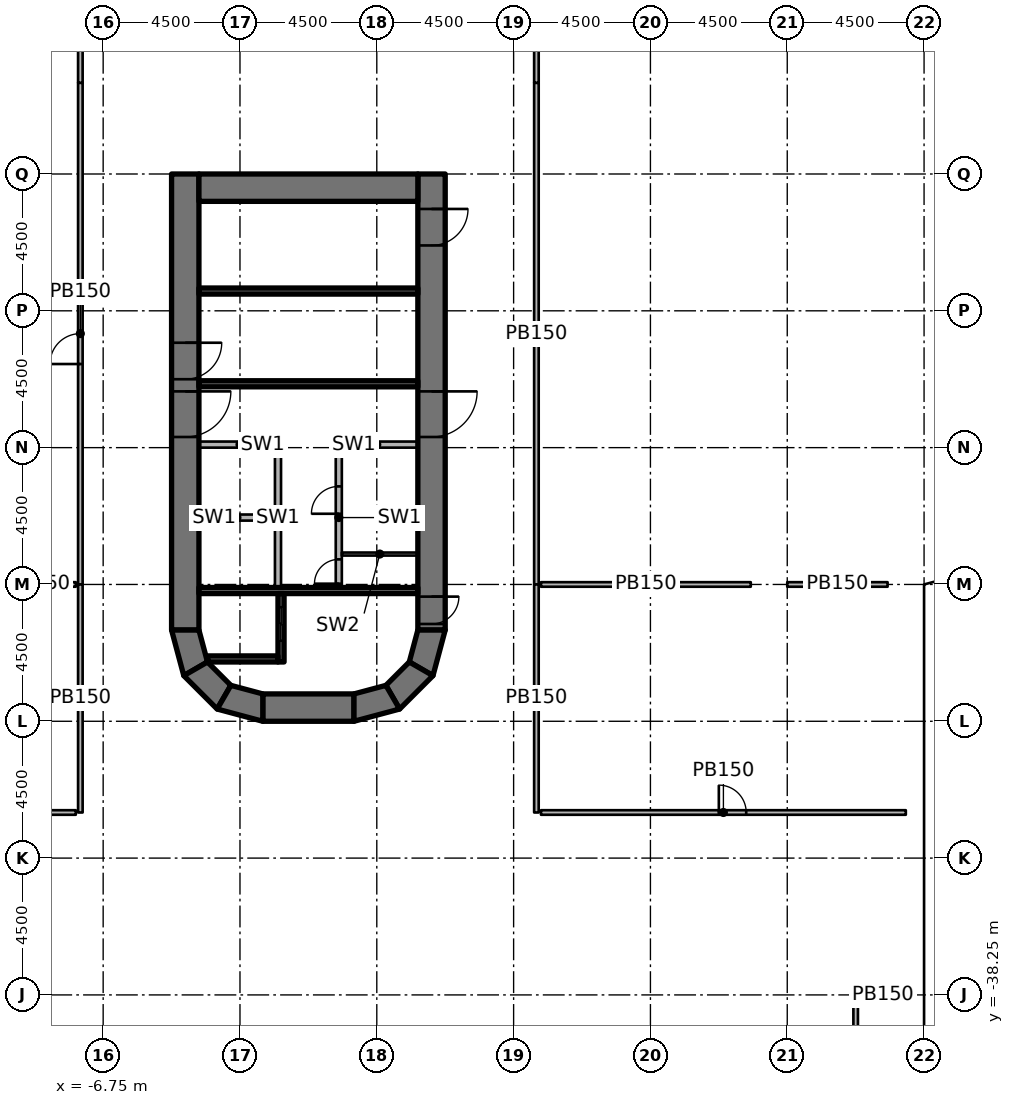
"""IFC4 building model, lengths in metres.
Left out: names, types, materials, properties, quantities, classifications, styles, units other than length and angle.
Written with IfcOpenShell. Run it as: python <this file> out.ifc"""

import sys

from ifc_helpers import new_model, si_unit, direction, frame, frame_2d, origin, origin_2d, place, context, subcontext, project, spatial, polyline, rectangle, outline, extrude, element, fill, save


model = new_model("IFC4")
c1 = context("Model", 3, precision=1e-05, world=origin(), true_north=direction((0.0, 1.0)))
c2 = subcontext(c1, "Body", "Model", "MODEL_VIEW")
j1 = project(units=[si_unit("LENGTHUNIT", "METRE"), si_unit("PLANEANGLEUNIT", "RADIAN")], contexts=[c1])
p1 = place(None, origin())
s1 = spatial("IfcSite", under=j1, at=p1, CompositionType="ELEMENT")
p2 = place(p1, origin())
s2 = spatial("IfcBuilding", under=s1, at=p2, CompositionType="ELEMENT")
p3 = place(p2, frame((0.0, 0.0, 12.0)))
s3 = spatial("IfcBuildingStorey", under=s2, at=p3, CompositionType="ELEMENT", Elevation=12.0)
for number, where, z_axis, x_axis in (
    (1, (-6.25, -26.9, 0.0), (0.0, 0.0, 1.0), (1.0, 0.0, 0.0)),
    (2, (-6.25, -24.65, 0.0), (0.0, 0.0, 1.0), (1.0, 0.0, 0.0)),
    (3, (-6.25, -20.25, 0.0), (0.0, 0.0, 1.0), (1.0, 0.0, 0.0)),
    (4, (-6.25, -15.75, 0.0), (0.0, 0.0, 1.0), (1.0, 0.0, 0.0)),
    (5, (-6.25, -10.75, 0.0), (0.0, 0.0, 1.0), (1.0, 0.0, 0.0)),
    (6, (-2.25, -33.11, 0.0), (0.0, 0.0, 1.0), (1.0, 0.0, 0.0)),
    (7, (2.25, -33.11, 0.0), (0.0, 0.0, 1.0), (1.0, 0.0, 0.0)),
    (8, (6.25, -26.9, 0.0), (0.0, 0.0, 1.0), (1.0, 0.0, 0.0)),
    (9, (6.25, -24.65, 0.0), (0.0, 0.0, 1.0), (1.0, 0.0, 0.0)),
    (10, (6.25, -20.25, 0.0), (0.0, 0.0, 1.0), (1.0, 0.0, 0.0)),
    (11, (6.25, -15.75, 0.0), (0.0, 0.0, 1.0), (1.0, 0.0, 0.0)),
    (12, (6.25, -10.75, 0.0), (0.0, 0.0, 1.0), (1.0, 0.0, 0.0)),
    (13, (10.65, -38.85, 0.0), (0.0, 0.0, 1.0), (1.0, 0.0, 0.0)),
    (14, (10.65, -33.75, 0.0), (0.0, 0.0, 1.0), (1.0, 0.0, 0.0)),
    (15, (10.65, -20.25, 0.0), (0.0, 0.0, 1.0), (1.0, 0.0, 0.0)),
    (16, (10.65, -15.15, 0.0), (0.0, 0.0, 1.0), (1.0, 0.0, 0.0)),
    (17, (15.367, -39.68, 0.0), (0.0, 0.0, 1.0), (1.0, 0.0, 0.0)),
    (18, (15.15, -24.75, 0.0), (0.0, 0.0, 1.0), (1.0, 0.0, 0.0)),
    (19, (15.15, -19.65, 0.0), (0.0, 0.0, 1.0), (1.0, 0.0, 0.0)),
    (20, (15.15, -10.65, 0.0), (0.0, 0.0, 1.0), (1.0, 0.0, 0.0)),
    (21, (19.65, -29.25, 0.0), (0.0, 0.0, 1.0), (1.0, 0.0, 0.0)),
    (22, (19.65, -24.15, 0.0), (0.0, 0.0, 1.0), (1.0, 0.0, 0.0)),
    (23, (19.65, -15.15, 0.0), (0.0, 0.0, 1.0), (1.0, 0.0, 0.0)),
):
    element("IfcColumn", number, at=place(p3, frame(where, z_axis=z_axis, x_axis=x_axis)), inside=s3, PredefinedType="COLUMN", context=c2, shape_type="SweptSolid", body=[
        extrude(rectangle(XDim=1.2, YDim=1.2, at=origin_2d()), origin(), (0.0, 0.0, 1.0), 4.55),
    ])
p4 = place(p3, frame((-4.05, -11.25, 0.0), z_axis=(0.0, 0.0, 1.0), x_axis=(0.0, -1.0, 0.0)))
e24 = element("IfcWall", 24, at=p4, inside=s3, PredefinedType="SHEAR", context=c2, shape_type="SweptSolid", body=[
    extrude(rectangle(XDim=15.0, YDim=0.9, at=frame_2d((7.5, 0.0))), origin(), (0.0, 0.0, 1.0), 5.0),
])
p5 = place(p4, frame((7.15, 0.0, 0.0)))
e25 = element("IfcOpeningElement", 25, at=p5, cuts=e24, PredefinedType="OPENING", context=c2, shape_type="SweptSolid", body=[
    extrude(rectangle(XDim=1.5, YDim=2.3, at=frame_2d((0.75, 1.15))), frame((0.0, 0.46, 0.0), z_axis=(0.0, -1.0, 0.0), x_axis=(1.0, 0.0, 0.0)), (0.0, 0.0, 1.0), 0.92),
])
p6 = place(p4, frame((5.55, 0.0, 0.0)))
e26 = element("IfcOpeningElement", 26, at=p6, cuts=e24, PredefinedType="OPENING", context=c2, shape_type="SweptSolid", body=[
    extrude(rectangle(XDim=1.2, YDim=2.1, at=frame_2d((0.6, 1.05))), frame((0.0, 0.46, 0.0), z_axis=(0.0, -1.0, 0.0), x_axis=(1.0, 0.0, 0.0)), (0.0, 0.0, 1.0), 0.92),
])
p7 = place(p3, frame((4.05, -11.25, 0.0), z_axis=(0.0, 0.0, 1.0), x_axis=(0.0, -1.0, 0.0)))
e27 = element("IfcWall", 27, at=p7, inside=s3, PredefinedType="SHEAR", context=c2, shape_type="SweptSolid", body=[
    extrude(rectangle(XDim=15.0, YDim=0.9, at=frame_2d((7.5, 0.0))), origin(), (0.0, 0.0, 1.0), 5.0),
])
p8 = place(p7, frame((7.15, 0.0, 0.0)))
e28 = element("IfcOpeningElement", 28, at=p8, cuts=e27, PredefinedType="OPENING", context=c2, shape_type="SweptSolid", body=[
    extrude(rectangle(XDim=1.5, YDim=2.3, at=frame_2d((0.75, 1.15))), frame((0.0, 0.46, 0.0), z_axis=(0.0, -1.0, 0.0), x_axis=(1.0, 0.0, 0.0)), (0.0, 0.0, 1.0), 0.92),
])
p9 = place(p7, frame((13.9, 0.0, 0.0)))
e29 = element("IfcOpeningElement", 29, at=p9, cuts=e27, PredefinedType="OPENING", context=c2, shape_type="SweptSolid", body=[
    extrude(rectangle(XDim=0.9, YDim=2.1, at=frame_2d((0.45, 1.05))), frame((0.0, 0.46, 0.0), z_axis=(0.0, -1.0, 0.0), x_axis=(1.0, 0.0, 0.0)), (0.0, 0.0, 1.0), 0.92),
])
p10 = place(p7, frame((1.15, 0.0, 0.0)))
e30 = element("IfcOpeningElement", 30, at=p10, cuts=e27, PredefinedType="OPENING", context=c2, shape_type="SweptSolid", body=[
    extrude(rectangle(XDim=1.2, YDim=2.1, at=frame_2d((0.6, 1.05))), frame((0.0, 0.46, 0.0), z_axis=(0.0, -1.0, 0.0), x_axis=(1.0, 0.0, 0.0)), (0.0, 0.0, 1.0), 0.92),
])
p11 = place(p3, frame((-3.6, -11.7, 0.0), z_axis=(0.0, 0.0, 1.0), x_axis=(1.0, 0.0, 0.0)))
e31 = element("IfcWall", 31, at=p11, inside=s3, PredefinedType="SHEAR", context=c2, shape_type="SweptSolid", body=[
    extrude(rectangle(XDim=7.2, YDim=0.9, at=frame_2d((3.6, 0.0))), origin(), (0.0, 0.0, 1.0), 5.0),
])
p12 = place(p3, frame((-1.5, -28.8, 0.0), z_axis=(0.0, 0.0, 1.0), x_axis=(1.0, 0.0, 0.0)))
e32 = element("IfcWall", 32, at=p12, inside=s3, PredefinedType="SHEAR", context=c2, shape_type="SweptSolid", body=[
    extrude(rectangle(XDim=3.0, YDim=0.9, at=frame_2d((1.5, 0.0))), origin(), (0.0, 0.0, 1.0), 5.0),
])
p13 = place(p3, origin())
e33 = element("IfcWall", 33, at=p13, inside=s3, PredefinedType="SHEAR", context=c2, shape_type="SweptSolid", body=[
    extrude(outline(polyline([(-4.5, -26.25), (-4.098, -27.75), (-3.319, -27.3), (-3.6, -26.25), (-4.5, -26.25)])), origin(), (0.0, 0.0, 1.0), 5.0),
])
p14 = place(p3, origin())
e34 = element("IfcWall", 34, at=p14, inside=s3, PredefinedType="SHEAR", context=c2, shape_type="SweptSolid", body=[
    extrude(outline(polyline([(-4.098, -27.75), (-3.0, -28.848), (-2.55, -28.069), (-3.319, -27.3), (-4.098, -27.75)])), origin(), (0.0, 0.0, 1.0), 5.0),
])
p15 = place(p3, origin())
e35 = element("IfcWall", 35, at=p15, inside=s3, PredefinedType="SHEAR", context=c2, shape_type="SweptSolid", body=[
    extrude(outline(polyline([(-3.0, -28.848), (-1.5, -29.25), (-1.5, -28.35), (-2.55, -28.069), (-3.0, -28.848)])), origin(), (0.0, 0.0, 1.0), 5.0),
])
p16 = place(p3, origin())
e36 = element("IfcWall", 36, at=p16, inside=s3, PredefinedType="SHEAR", context=c2, shape_type="SweptSolid", body=[
    extrude(outline(polyline([(4.5, -26.25), (4.098, -27.75), (3.319, -27.3), (3.6, -26.25), (4.5, -26.25)])), origin(), (0.0, 0.0, 1.0), 5.0),
])
p17 = place(p3, origin())
e37 = element("IfcWall", 37, at=p17, inside=s3, PredefinedType="SHEAR", context=c2, shape_type="SweptSolid", body=[
    extrude(outline(polyline([(4.098, -27.75), (3.0, -28.848), (2.55, -28.069), (3.319, -27.3), (4.098, -27.75)])), origin(), (0.0, 0.0, 1.0), 5.0),
])
p18 = place(p3, origin())
e38 = element("IfcWall", 38, at=p18, inside=s3, PredefinedType="SHEAR", context=c2, shape_type="SweptSolid", body=[
    extrude(outline(polyline([(3.0, -28.848), (1.5, -29.25), (1.5, -28.35), (2.55, -28.069), (3.0, -28.848)])), origin(), (0.0, 0.0, 1.0), 5.0),
])
p19 = place(p3, frame((3.6, -24.95, 0.0), z_axis=(0.0, 0.0, 1.0), x_axis=(-1.0, 0.0, 0.0)))
e39 = element("IfcWall", 39, at=p19, inside=s3, PredefinedType="SHEAR", context=c2, shape_type="SweptSolid", body=[
    extrude(rectangle(XDim=7.2, YDim=0.2, at=frame_2d((3.6, 0.0))), origin(), (0.0, 0.0, 1.0), 4.55),
])
p20 = place(p3, frame((-0.9, -27.3, 0.0), z_axis=(0.0, 0.0, 1.0), x_axis=(0.0, 1.0, 0.0)))
e40 = element("IfcWall", 40, at=p20, inside=s3, PredefinedType="SHEAR", context=c2, shape_type="SweptSolid", body=[
    extrude(rectangle(XDim=2.25, YDim=0.2, at=frame_2d((1.125, 0.0))), origin(), (0.0, 0.0, 1.0), 4.55),
])
p21 = place(p20, frame((0.7, 0.0, 0.0)))
e41 = element("IfcOpeningElement", 41, at=p21, cuts=e40, PredefinedType="OPENING", context=c2, shape_type="SweptSolid", body=[
    extrude(rectangle(XDim=1.1, YDim=2.3, at=frame_2d((0.55, 1.15))), frame((0.0, 0.11, 0.0), z_axis=(0.0, -1.0, 0.0), x_axis=(1.0, 0.0, 0.0)), (0.0, 0.0, 1.0), 0.22),
])
p22 = place(p3, origin())
e42 = element("IfcWall", 42, at=p22, inside=s3, PredefinedType="SHEAR", context=c2, shape_type="SweptSolid", body=[
    extrude(outline(polyline([(-1.0, -27.1), (-3.341, -27.1), (-3.291, -27.284), (-3.275, -27.3), (-1.0, -27.3), (-1.0, -27.1)])), origin(), (0.0, 0.0, 1.0), 4.55),
])
for number, where, z_axis, x_axis in (
    (43, (3.6, -18.15, 0.0), (0.0, 0.0, 1.0), (-1.0, 0.0, 0.0)),
    (44, (3.6, -15.1, 0.0), (0.0, 0.0, 1.0), (-1.0, 0.0, 0.0)),
):
    element("IfcWall", number, at=place(p3, frame(where, z_axis=z_axis, x_axis=x_axis)), inside=s3, PredefinedType="SHEAR", context=c2, shape_type="SweptSolid", body=[
        extrude(rectangle(XDim=7.2, YDim=0.2, at=frame_2d((3.6, 0.0))), origin(), (0.0, 0.0, 1.0), 4.55),
    ])
p23 = place(p3, frame((3.6, -20.15, 0.0), z_axis=(0.0, 0.0, 1.0), x_axis=(-1.0, 0.0, 0.0)))
e45 = element("IfcWall", 45, at=p23, inside=s3, PredefinedType="PARTITIONING", context=c2, shape_type="SweptSolid", body=[
    extrude(rectangle(XDim=2.7, YDim=0.2, at=frame_2d((1.35, 0.0))), origin(), (0.0, 0.0, 1.0), 4.55),
])
p24 = place(p3, frame((1.0, -24.85, 0.0), z_axis=(0.0, 0.0, 1.0), x_axis=(0.0, 1.0, 0.0)))
e46 = element("IfcWall", 46, at=p24, inside=s3, PredefinedType="PARTITIONING", context=c2, shape_type="SweptSolid", body=[
    extrude(rectangle(XDim=4.6, YDim=0.2, at=frame_2d((2.3, 0.0))), origin(), (0.0, 0.0, 1.0), 4.55),
])
p25 = place(p24, frame((0.125, 0.0, 0.0)))
e47 = element("IfcOpeningElement", 47, at=p25, cuts=e46, PredefinedType="OPENING", context=c2, shape_type="SweptSolid", body=[
    extrude(rectangle(XDim=0.8, YDim=2.1, at=frame_2d((0.4, 1.05))), frame((0.0, 0.11, 0.0), z_axis=(0.0, -1.0, 0.0), x_axis=(1.0, 0.0, 0.0)), (0.0, 0.0, 1.0), 0.22),
])
p26 = place(p24, frame((2.425, 0.0, 0.0)))
e48 = element("IfcOpeningElement", 48, at=p26, cuts=e46, PredefinedType="OPENING", context=c2, shape_type="SweptSolid", body=[
    extrude(rectangle(XDim=0.9, YDim=2.1, at=frame_2d((0.45, 1.05))), frame((0.0, 0.11, 0.0), z_axis=(0.0, -1.0, 0.0), x_axis=(1.0, 0.0, 0.0)), (0.0, 0.0, 1.0), 0.22),
])
p27 = place(p3, frame((-0.9, -20.15, 0.0), z_axis=(0.0, 0.0, 1.0), x_axis=(-1.0, 0.0, 0.0)))
e49 = element("IfcWall", 49, at=p27, inside=s3, PredefinedType="PARTITIONING", context=c2, shape_type="SweptSolid", body=[
    extrude(rectangle(XDim=2.7, YDim=0.2, at=frame_2d((1.35, 0.0))), origin(), (0.0, 0.0, 1.0), 4.55),
])
p28 = place(p3, frame((-1.0, -24.85, 0.0), z_axis=(0.0, 0.0, 1.0), x_axis=(0.0, 1.0, 0.0)))
e50 = element("IfcWall", 50, at=p28, inside=s3, PredefinedType="PARTITIONING", context=c2, shape_type="SweptSolid", body=[
    extrude(rectangle(XDim=4.6, YDim=0.2, at=frame_2d((2.3, 0.0))), origin(), (0.0, 0.0, 1.0), 4.55),
])
p29 = place(p3, frame((3.6, -23.75, 0.0), z_axis=(0.0, 0.0, 1.0), x_axis=(-1.0, 0.0, 0.0)))
e51 = element("IfcWall", 51, at=p29, inside=s3, PredefinedType="PARTITIONING", context=c2, shape_type="SweptSolid", body=[
    extrude(rectangle(XDim=2.5, YDim=0.1, at=frame_2d((1.25, 0.0))), origin(), (0.0, 0.0, 1.0), 4.55),
])
p30 = place(p3, frame((-1.1, -22.55, 0.0), z_axis=(0.0, 0.0, 1.0), x_axis=(-1.0, 0.0, 0.0)))
e52 = element("IfcWall", 52, at=p30, inside=s3, PredefinedType="PARTITIONING", context=c2, shape_type="SweptSolid", body=[
    extrude(rectangle(XDim=2.5, YDim=0.2, at=frame_2d((1.25, 0.0))), origin(), (0.0, 0.0, 1.0), 4.55),
])
p31 = place(p3, frame((18.0, -38.25, 0.0), z_axis=(0.0, 0.0, 1.0), x_axis=(0.0, -1.0, 0.0)))
e53 = element("IfcWall", 53, at=p31, inside=s3, PredefinedType="PARTITIONING", context=c2, shape_type="SweptSolid", body=[
    extrude(rectangle(XDim=8.38, YDim=0.15, at=frame_2d((4.19, 0.0))), origin(), (0.0, 0.0, 1.0), 4.55),
])
p32 = place(p31, frame((5.25, 0.0, 0.0)))
e54 = element("IfcOpeningElement", 54, at=p32, cuts=e53, PredefinedType="OPENING", context=c2, shape_type="SweptSolid", body=[
    extrude(rectangle(XDim=0.9, YDim=2.1, at=frame_2d((0.45, 1.05))), frame((0.0, 0.085, 0.0), z_axis=(0.0, -1.0, 0.0), x_axis=(1.0, 0.0, 0.0)), (0.0, 0.0, 1.0), 0.17),
])
p33 = place(p3, frame((18.15, -38.25, 0.0), z_axis=(0.0, 0.0, 1.0), x_axis=(1.0, 0.0, 0.0)))
e55 = element("IfcWall", 55, at=p33, inside=s3, PredefinedType="PARTITIONING", context=c2, shape_type="SweptSolid", body=[
    extrude(rectangle(XDim=1.5, YDim=0.15, at=frame_2d((0.75, 0.0))), origin(), (0.0, 0.0, 1.0), 4.55),
])
p34 = place(p3, frame((7.5, -8.25, 0.0), z_axis=(0.0, 0.0, 1.0), x_axis=(0.0, -1.0, 0.0)))
e56 = element("IfcWall", 56, at=p34, inside=s3, PredefinedType="PARTITIONING", context=c2, shape_type="SweptSolid", body=[
    extrude(rectangle(XDim=16.5, YDim=0.15, at=frame_2d((8.25, 0.0))), origin(), (0.0, 0.0, 1.0), 4.55),
])
p35 = place(p3, frame((7.5, -24.75, 0.0), z_axis=(0.0, 0.0, 1.0), x_axis=(0.0, -1.0, 0.0)))
e57 = element("IfcWall", 57, at=p35, inside=s3, PredefinedType="PARTITIONING", context=c2, shape_type="SweptSolid", body=[
    extrude(rectangle(XDim=7.5, YDim=0.15, at=frame_2d((3.75, 0.0))), origin(), (0.0, 0.0, 1.0), 4.55),
])
p36 = place(p3, frame((-7.5, -24.75, 0.0), z_axis=(0.0, 0.0, 1.0), x_axis=(0.0, 1.0, 0.0)))
e58 = element("IfcWall", 58, at=p36, inside=s3, PredefinedType="PARTITIONING", context=c2, shape_type="SweptSolid", body=[
    extrude(rectangle(XDim=16.5, YDim=0.15, at=frame_2d((8.25, 0.0))), origin(), (0.0, 0.0, 1.0), 4.55),
])
p37 = place(p36, frame((7.25, 0.0, 0.0)))
e59 = element("IfcOpeningElement", 59, at=p37, cuts=e58, PredefinedType="OPENING", context=c2, shape_type="SweptSolid", body=[
    extrude(rectangle(XDim=1.0, YDim=2.1, at=frame_2d((0.5, 1.05))), frame((0.0, 0.085, 0.0), z_axis=(0.0, -1.0, 0.0), x_axis=(1.0, 0.0, 0.0)), (0.0, 0.0, 1.0), 0.17),
])
p38 = place(p3, frame((-7.5, -32.25, 0.0), z_axis=(0.0, 0.0, 1.0), x_axis=(0.0, 1.0, 0.0)))
e60 = element("IfcWall", 60, at=p38, inside=s3, PredefinedType="PARTITIONING", context=c2, shape_type="SweptSolid", body=[
    extrude(rectangle(XDim=7.5, YDim=0.15, at=frame_2d((3.75, 0.0))), origin(), (0.0, 0.0, 1.0), 4.55),
])
p39 = place(p3, frame((19.05, -24.75, 0.0), z_axis=(0.0, 0.0, 1.0), x_axis=(-1.0, 0.0, 0.0)))
e61 = element("IfcWall", 61, at=p39, inside=s3, PredefinedType="PARTITIONING", context=c2, shape_type="SweptSolid", body=[
    extrude(rectangle(XDim=3.3, YDim=0.15, at=frame_2d((1.65, 0.0))), origin(), (0.0, 0.0, 1.0), 4.55),
])
p40 = place(p3, frame((14.55, -24.75, 0.0), z_axis=(0.0, 0.0, 1.0), x_axis=(-1.0, 0.0, 0.0)))
e62 = element("IfcWall", 62, at=p40, inside=s3, PredefinedType="PARTITIONING", context=c2, shape_type="SweptSolid", body=[
    extrude(rectangle(XDim=6.9, YDim=0.15, at=frame_2d((3.45, 0.0))), origin(), (0.0, 0.0, 1.0), 4.55),
])
p41 = place(p3, frame((7.5, -8.25, 0.0), z_axis=(0.0, 0.0, 1.0), x_axis=(0.0, 1.0, 0.0)))
e63 = element("IfcWall", 63, at=p41, inside=s3, PredefinedType="PARTITIONING", context=c2, shape_type="SweptSolid", body=[
    extrude(rectangle(XDim=6.6, YDim=0.15, at=frame_2d((3.3, 0.0))), origin(), (0.0, 0.0, 1.0), 4.55),
])
p42 = place(p3, frame((7.65, -32.25, 0.0), z_axis=(0.0, 0.0, 1.0), x_axis=(1.0, 0.0, 0.0)))
e64 = element("IfcWall", 64, at=p42, inside=s3, PredefinedType="PARTITIONING", context=c2, shape_type="SweptSolid", body=[
    extrude(rectangle(XDim=12.0, YDim=0.15, at=frame_2d((6.0, 0.0))), origin(), (0.0, 0.0, 1.0), 4.55),
])
p43 = place(p42, frame((5.85, 0.0, 0.0)))
e65 = element("IfcOpeningElement", 65, at=p43, cuts=e64, PredefinedType="OPENING", context=c2, shape_type="SweptSolid", body=[
    extrude(rectangle(XDim=0.9, YDim=2.1, at=frame_2d((0.45, 1.05))), frame((0.0, 0.085, 0.0), z_axis=(0.0, -1.0, 0.0), x_axis=(1.0, 0.0, 0.0)), (0.0, 0.0, 1.0), 0.17),
])
p44 = place(p3, frame((-7.65, -24.75, 0.0), z_axis=(0.0, 0.0, 1.0), x_axis=(-1.0, 0.0, 0.0)))
e66 = element("IfcWall", 66, at=p44, inside=s3, PredefinedType="PARTITIONING", context=c2, shape_type="SweptSolid", body=[
    extrude(rectangle(XDim=2.4, YDim=0.15, at=frame_2d((1.2, 0.0))), origin(), (0.0, 0.0, 1.0), 4.55),
])
p45 = place(p3, frame((-7.5, -1.65, 0.0), z_axis=(0.0, 0.0, 1.0), x_axis=(0.0, -1.0, 0.0)))
e67 = element("IfcWall", 67, at=p45, inside=s3, PredefinedType="PARTITIONING", context=c2, shape_type="SweptSolid", body=[
    extrude(rectangle(XDim=6.6, YDim=0.15, at=frame_2d((3.3, 0.0))), origin(), (0.0, 0.0, 1.0), 4.55),
])
p46 = place(p3, frame((-19.65, -32.25, 0.0), z_axis=(0.0, 0.0, 1.0), x_axis=(1.0, 0.0, 0.0)))
e68 = element("IfcWall", 68, at=p46, inside=s3, PredefinedType="PARTITIONING", context=c2, shape_type="SweptSolid", body=[
    extrude(rectangle(XDim=12.0, YDim=0.15, at=frame_2d((6.0, 0.0))), origin(), (0.0, 0.0, 1.0), 4.55),
])
p47 = place(p46, frame((5.25, 0.0, 0.0)))
e69 = element("IfcOpeningElement", 69, at=p47, cuts=e68, PredefinedType="OPENING", context=c2, shape_type="SweptSolid", body=[
    extrude(rectangle(XDim=0.9, YDim=2.1, at=frame_2d((0.45, 1.05))), frame((0.0, 0.085, 0.0), z_axis=(0.0, -1.0, 0.0), x_axis=(1.0, 0.0, 0.0)), (0.0, 0.0, 1.0), 0.17),
])
p48 = place(p8, origin())
e70 = element("IfcDoor", 70, at=p48, inside=s3, OperationType="DOUBLE_DOOR_SINGLE_SWING", PredefinedType="DOOR", context=c2, shape_type="SweptSolid", body=[
    extrude(rectangle(XDim=1.5, YDim=2.3, at=frame_2d((0.75, 1.15))), frame((0.0, 0.025, 0.0), z_axis=(0.0, -1.0, 0.0), x_axis=(1.0, 0.0, 0.0)), (0.0, 0.0, 1.0), 0.05),
])
fill(e28, e70)
p49 = place(p5, origin())
e71 = element("IfcDoor", 71, at=p49, inside=s3, OperationType="DOUBLE_DOOR_SINGLE_SWING", PredefinedType="DOOR", context=c2, shape_type="SweptSolid", body=[
    extrude(rectangle(XDim=1.5, YDim=2.3, at=frame_2d((0.75, 1.15))), frame((0.0, 0.025, 0.0), z_axis=(0.0, -1.0, 0.0), x_axis=(1.0, 0.0, 0.0)), (0.0, 0.0, 1.0), 0.05),
])
fill(e25, e71)
p50 = place(p9, origin())
e72 = element("IfcDoor", 72, at=p50, inside=s3, OperationType="SINGLE_SWING_RIGHT", PredefinedType="DOOR", context=c2, shape_type="SweptSolid", body=[
    extrude(rectangle(XDim=0.9, YDim=2.1, at=frame_2d((0.45, 1.05))), frame((0.0, 0.025, 0.0), z_axis=(0.0, -1.0, 0.0), x_axis=(1.0, 0.0, 0.0)), (0.0, 0.0, 1.0), 0.05),
])
fill(e29, e72)
p51 = place(p6, origin())
e73 = element("IfcDoor", 73, at=p51, inside=s3, OperationType="SINGLE_SWING_LEFT", PredefinedType="DOOR", context=c2, shape_type="SweptSolid", body=[
    extrude(rectangle(XDim=1.2, YDim=2.1, at=frame_2d((0.6, 1.05))), frame((0.0, 0.025, 0.0), z_axis=(0.0, -1.0, 0.0), x_axis=(1.0, 0.0, 0.0)), (0.0, 0.0, 1.0), 0.05),
])
fill(e26, e73)
p52 = place(p10, origin())
e74 = element("IfcDoor", 74, at=p52, inside=s3, OperationType="SINGLE_SWING_RIGHT", PredefinedType="DOOR", context=c2, shape_type="SweptSolid", body=[
    extrude(rectangle(XDim=1.2, YDim=2.1, at=frame_2d((0.6, 1.05))), frame((0.0, 0.025, 0.0), z_axis=(0.0, -1.0, 0.0), x_axis=(1.0, 0.0, 0.0)), (0.0, 0.0, 1.0), 0.05),
])
fill(e30, e74)
p53 = place(p21, origin())
e75 = element("IfcDoor", 75, at=p53, inside=s3, OperationType="DOUBLE_DOOR_SLIDING", PredefinedType="DOOR", context=c2, shape_type="SweptSolid", body=[
    extrude(rectangle(XDim=1.1, YDim=2.3, at=frame_2d((0.55, 1.15))), frame((0.0, 0.025, 0.0), z_axis=(0.0, -1.0, 0.0), x_axis=(1.0, 0.0, 0.0)), (0.0, 0.0, 1.0), 0.05),
])
fill(e41, e75)
p54 = place(p25, origin())
e76 = element("IfcDoor", 76, at=p54, inside=s3, OperationType="SINGLE_SWING_RIGHT", PredefinedType="DOOR", context=c2, shape_type="SweptSolid", body=[
    extrude(rectangle(XDim=0.8, YDim=2.1, at=frame_2d((0.4, 1.05))), frame((0.0, 0.025, 0.0), z_axis=(0.0, -1.0, 0.0), x_axis=(1.0, 0.0, 0.0)), (0.0, 0.0, 1.0), 0.05),
])
fill(e47, e76)
p55 = place(p26, origin())
e77 = element("IfcDoor", 77, at=p55, inside=s3, OperationType="SINGLE_SWING_RIGHT", PredefinedType="DOOR", context=c2, shape_type="SweptSolid", body=[
    extrude(rectangle(XDim=0.9, YDim=2.1, at=frame_2d((0.45, 1.05))), frame((0.0, 0.025, 0.0), z_axis=(0.0, -1.0, 0.0), x_axis=(1.0, 0.0, 0.0)), (0.0, 0.0, 1.0), 0.05),
])
fill(e48, e77)
p56 = place(p37, origin())
e78 = element("IfcDoor", 78, at=p56, inside=s3, OperationType="SINGLE_SWING_LEFT", PredefinedType="DOOR", context=c2, shape_type="SweptSolid", body=[
    extrude(rectangle(XDim=1.0, YDim=2.1, at=frame_2d((0.5, 1.05))), frame((0.0, 0.025, 0.0), z_axis=(0.0, -1.0, 0.0), x_axis=(1.0, 0.0, 0.0)), (0.0, 0.0, 1.0), 0.05),
])
fill(e59, e78)
p57 = place(p43, origin())
e79 = element("IfcDoor", 79, at=p57, inside=s3, OperationType="SINGLE_SWING_LEFT", PredefinedType="DOOR", context=c2, shape_type="SweptSolid", body=[
    extrude(rectangle(XDim=0.9, YDim=2.1, at=frame_2d((0.45, 1.05))), frame((0.0, 0.025, 0.0), z_axis=(0.0, -1.0, 0.0), x_axis=(1.0, 0.0, 0.0)), (0.0, 0.0, 1.0), 0.05),
])
fill(e65, e79)
save(model, sys.argv[1])
